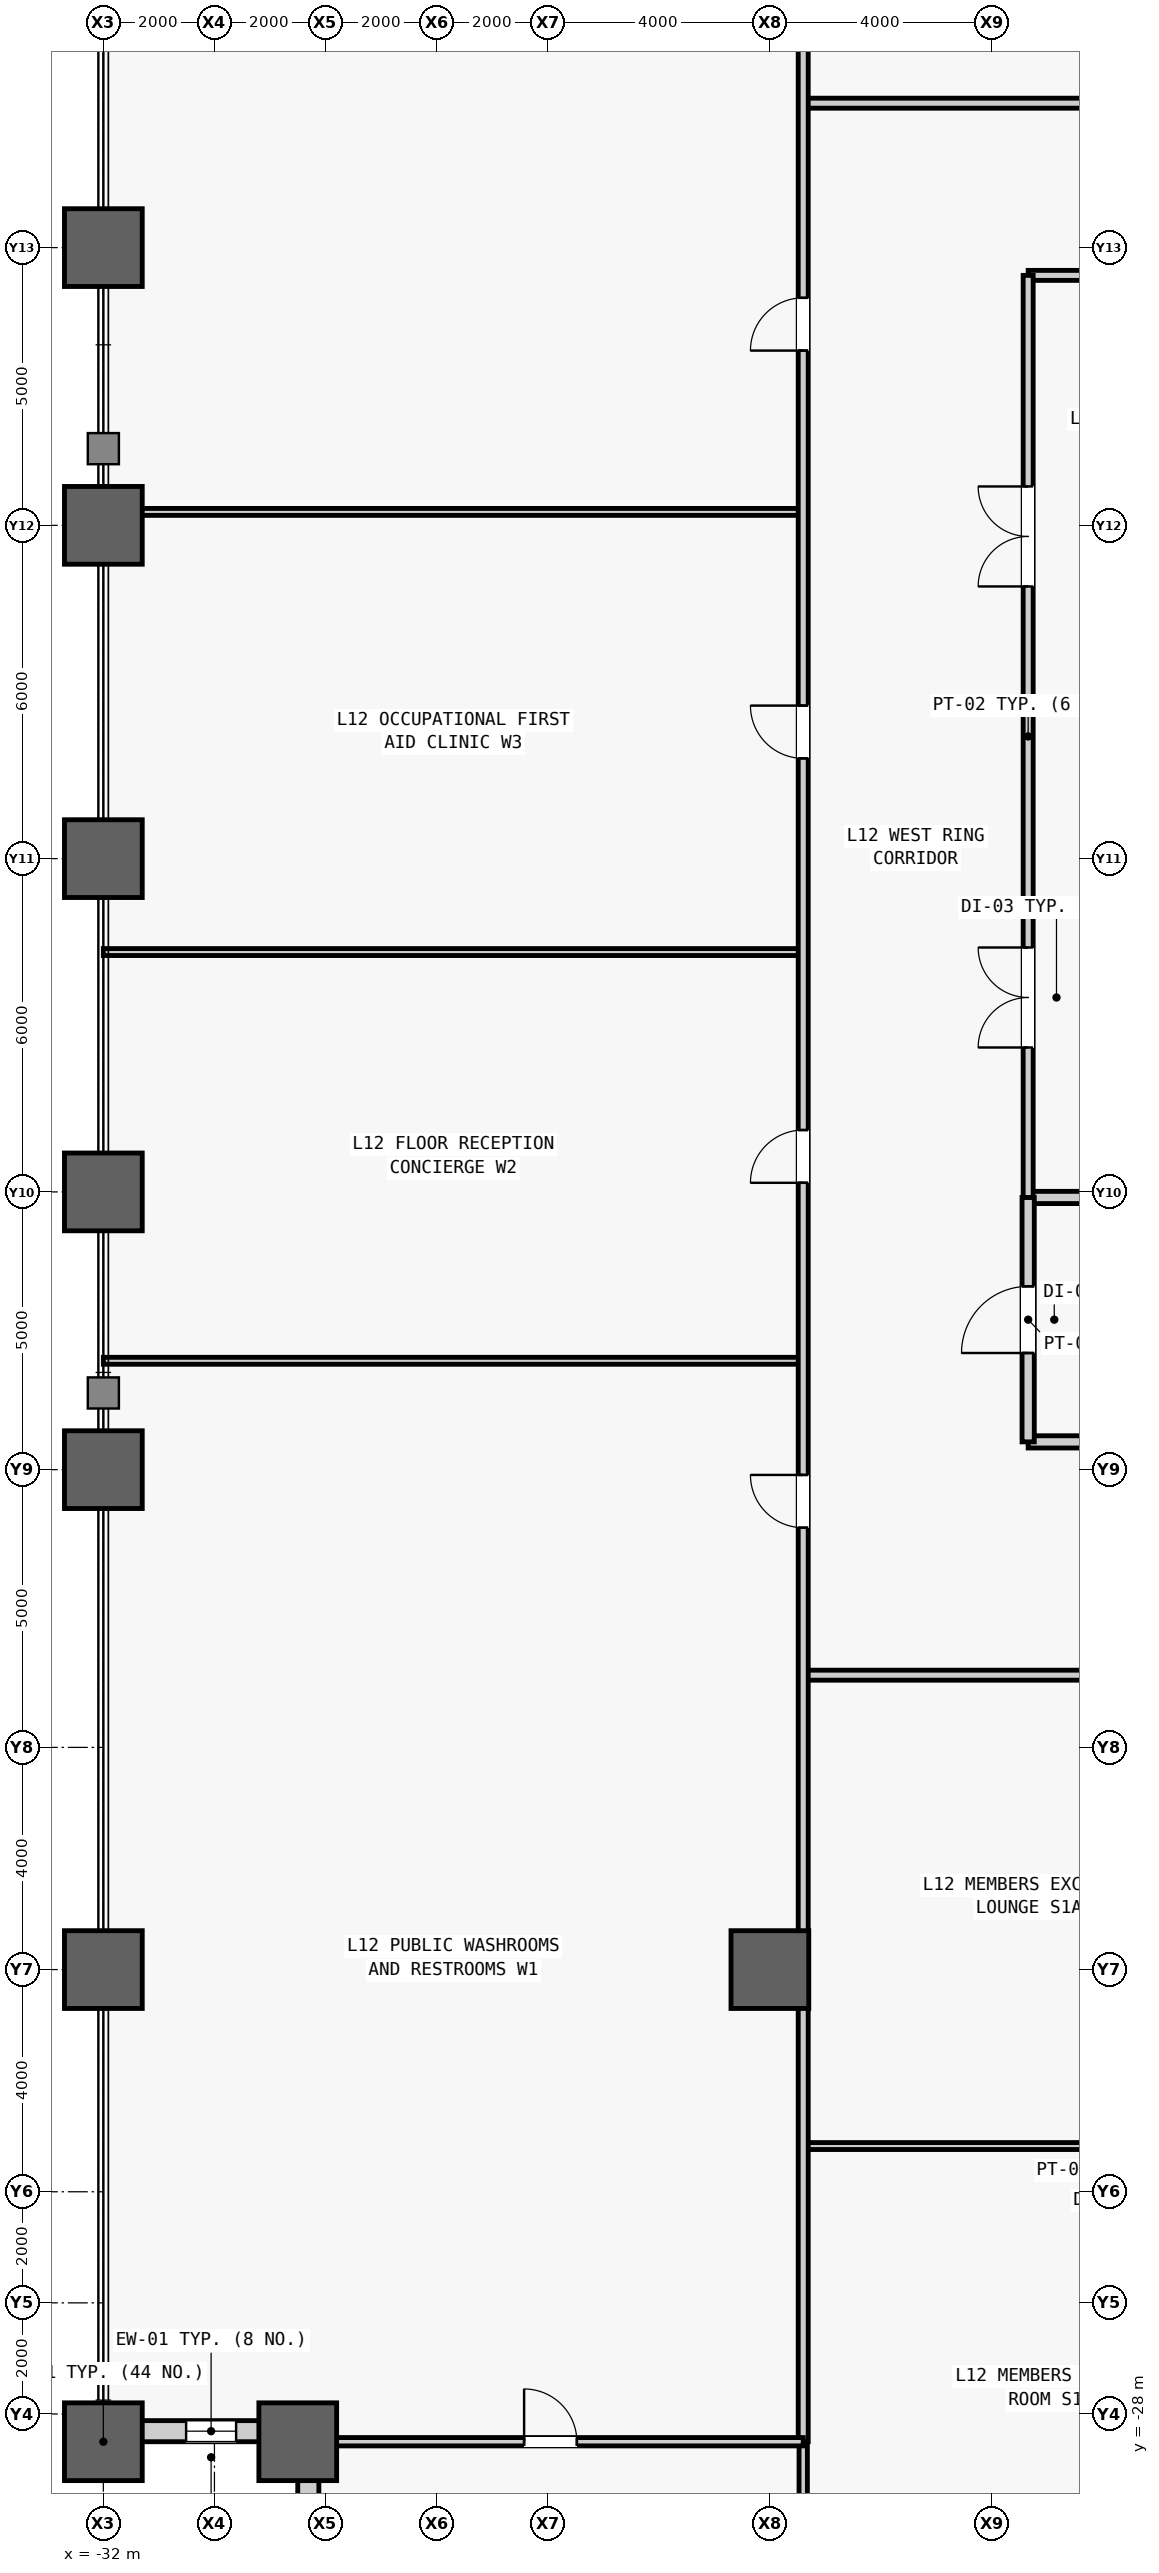
"""IFC4 building model, lengths in metres.
Left out: names, types, materials, properties, quantities, classifications, styles, units other than length and angle.
Written with IfcOpenShell. Run it as: python <this file> out.ifc"""

import sys

from ifc_helpers import new_model, si_unit, direction, frame, frame_2d, origin, origin_2d, place, context, subcontext, project, spatial, rectangle, hollow_rectangle, extrude, source, transform, mapped, element, fill, save


model = new_model("IFC4")
c1 = context("Model", 3, precision=1e-05, world=origin(), true_north=direction((0.0, 1.0)))
c2 = subcontext(c1, "Body", "Model", "MODEL_VIEW")
j1 = project(units=[si_unit("LENGTHUNIT", "METRE"), si_unit("PLANEANGLEUNIT", "RADIAN")], contexts=[c1])
p1 = place(None, origin())
s1 = spatial("IfcSite", under=j1, at=p1, CompositionType="ELEMENT")
p2 = place(p1, origin())
s2 = spatial("IfcBuilding", under=s1, at=p2, CompositionType="ELEMENT")
p3 = place(p2, frame((0.0, 0.0, 57.8)))
s3 = spatial("IfcBuildingStorey", under=s2, at=p3, CompositionType="ELEMENT", Elevation=57.8)
m1 = source(origin(), c2, "Body", "SweptSolid", [
    extrude(hollow_rectangle(XDim=1.4, YDim=1.4, WallThickness=0.075, at=origin_2d()), origin(), (0.0, 0.0, 1.0), 4.2),
])
for number, where, z_axis, x_axis in (
    (1, (-32.0, -28.5, 0.0), (0.0, 0.0, 1.0), (1.0, 0.0, 0.0)),
    (2, (-32.0, -20.0, 0.0), (0.0, 0.0, 1.0), (1.0, 0.0, 0.0)),
    (3, (-32.0, -11.0, 0.0), (0.0, 0.0, 1.0), (1.0, 0.0, 0.0)),
    (4, (-32.0, -6.0, 0.0), (0.0, 0.0, 1.0), (1.0, 0.0, 0.0)),
    (5, (-32.0, 0.0, 0.0), (0.0, 0.0, 1.0), (1.0, 0.0, 0.0)),
    (6, (-32.0, 6.0, 0.0), (0.0, 0.0, 1.0), (1.0, 0.0, 0.0)),
    (7, (-32.0, 11.0, 0.0), (0.0, 0.0, 1.0), (1.0, 0.0, 0.0)),
    (8, (-28.5, -28.5, 0.0), (0.0, 0.0, 1.0), (1.0, 0.0, 0.0)),
    (9, (-20.0, -20.0, 0.0), (0.0, 0.0, 1.0), (1.0, 0.0, 0.0)),
):
    element("IfcColumn", number, at=place(p3, frame(where, z_axis=z_axis, x_axis=x_axis)), inside=s3, PredefinedType="COLUMN", context=c2, shape_type="MappedRepresentation", body=[
        mapped(m1, transform((0.0, 0.0, 0.0), scale=1.0)),
    ])
m2 = source(origin(), c2, "Body", "SweptSolid", [
    extrude(rectangle(XDim=3.12, YDim=0.38, at=frame_2d((1.56, 0.0))), origin(), (0.0, 0.0, 1.0), 3.245),
])
p4 = place(p3, frame((-28.5, -28.31, 0.0), z_axis=(0.0, 0.0, 1.0), x_axis=(-1.0, 0.0, 0.0)))
e10 = element("IfcWall", 10, at=p4, inside=s3, PredefinedType="STANDARD", context=c2, shape_type="MappedRepresentation", body=[
    mapped(m2, transform((0.0, 0.0, 0.0), scale=1.0)),
])
m3 = source(origin(), c2, "Body", "SweptSolid", [
    extrude(rectangle(XDim=0.9, YDim=2.4, at=frame_2d((0.45, 1.2))), frame((0.0, 0.2, 0.0), z_axis=(0.0, -1.0, 0.0), x_axis=(1.0, 0.0, 0.0)), (0.0, 0.0, 1.0), 0.4),
])
p5 = place(p4, frame((1.11, 0.0, 0.5)))
e11 = element("IfcOpeningElement", 11, at=p5, cuts=e10, PredefinedType="OPENING", context=c2, shape_type="MappedRepresentation", body=[
    mapped(m3, transform((0.0, 0.0, 0.0), scale=1.0)),
])
p6 = place(p3, frame((-28.31, -31.62, 0.0), z_axis=(0.0, 0.0, 1.0), x_axis=(0.0, 1.0, 0.0)))
e12 = element("IfcWall", 12, at=p6, inside=s3, PredefinedType="STANDARD", context=c2, shape_type="MappedRepresentation", body=[
    mapped(m2, transform((0.0, 0.0, 0.0), scale=1.0)),
])
p7 = place(p6, frame((1.11, 0.0, 0.5)))
e13 = element("IfcOpeningElement", 13, at=p7, cuts=e12, PredefinedType="OPENING", context=c2, shape_type="MappedRepresentation", body=[
    mapped(m3, transform((0.0, 0.0, 0.0), scale=1.0)),
])
m4 = source(origin(), c2, "Body", "SweptSolid", [
    extrude(rectangle(XDim=4.05, YDim=0.22, at=frame_2d((2.025, 0.0))), origin(), (0.0, 0.0, 1.0), 3.94),
])
p8 = place(p3, frame((-15.35, -10.5, 0.0), z_axis=(0.0, 0.0, 1.0), x_axis=(1.0, 0.0, 0.0)))
e14 = element("IfcWall", 14, at=p8, inside=s3, PredefinedType="PARTITIONING", context=c2, shape_type="MappedRepresentation", body=[
    mapped(m4, transform((0.0, 0.0, 0.0), scale=1.0)),
])
m5 = source(origin(), c2, "Body", "SweptSolid", [
    extrude(rectangle(XDim=4.05, YDim=0.22, at=frame_2d((2.025, 0.0))), origin(), (0.0, 0.0, 1.0), 3.085),
])
p9 = place(p3, frame((-15.35, -6.1, 0.0), z_axis=(0.0, 0.0, 1.0), x_axis=(1.0, 0.0, 0.0)))
e15 = element("IfcWall", 15, at=p9, inside=s3, PredefinedType="PARTITIONING", context=c2, shape_type="MappedRepresentation", body=[
    mapped(m5, transform((0.0, 0.0, 0.0), scale=1.0)),
])
m6 = source(origin(), c2, "Body", "SweptSolid", [
    extrude(rectangle(XDim=4.4, YDim=0.22, at=frame_2d((2.2, 0.0))), origin(), (0.0, 0.0, 1.0), 3.94),
])
p10 = place(p3, frame((-15.35, -10.5, 0.0), z_axis=(0.0, 0.0, 1.0), x_axis=(0.0, 1.0, 0.0)))
e16 = element("IfcWall", 16, at=p10, inside=s3, PredefinedType="PARTITIONING", context=c2, shape_type="MappedRepresentation", body=[
    mapped(m6, transform((0.0, 0.0, 0.0), scale=1.0)),
])
m7 = source(origin(), c2, "Body", "SweptSolid", [
    extrude(rectangle(XDim=1.2, YDim=2.2, at=frame_2d((0.6, 1.1))), frame((0.0, 0.12, 0.0), z_axis=(0.0, -1.0, 0.0), x_axis=(1.0, 0.0, 0.0)), (0.0, 0.0, 1.0), 0.24),
])
p11 = place(p10, frame((1.6, 0.0, 0.0)))
e17 = element("IfcOpeningElement", 17, at=p11, cuts=e16, PredefinedType="OPENING", context=c2, shape_type="MappedRepresentation", body=[
    mapped(m7, transform((0.0, 0.0, 0.0), scale=1.0)),
])
m8 = source(origin(), c2, "Body", "SweptSolid", [
    extrude(rectangle(XDim=4.05, YDim=0.18, at=frame_2d((2.025, 0.0))), origin(), (0.0, 0.0, 1.0), 3.94),
])
p12 = place(p3, frame((-15.35, 10.5, 0.0), z_axis=(0.0, 0.0, 1.0), x_axis=(1.0, 0.0, 0.0)))
e18 = element("IfcWall", 18, at=p12, inside=s3, PredefinedType="PARTITIONING", context=c2, shape_type="MappedRepresentation", body=[
    mapped(m8, transform((0.0, 0.0, 0.0), scale=1.0)),
])
m9 = source(origin(), c2, "Body", "SweptSolid", [
    extrude(rectangle(XDim=16.6, YDim=0.18, at=frame_2d((8.3, 0.0))), origin(), (0.0, 0.0, 1.0), 3.94),
])
p13 = place(p3, frame((-15.35, -6.1, 0.0), z_axis=(0.0, 0.0, 1.0), x_axis=(0.0, 1.0, 0.0)))
e19 = element("IfcWall", 19, at=p13, inside=s3, PredefinedType="PARTITIONING", context=c2, shape_type="MappedRepresentation", body=[
    mapped(m9, transform((0.0, 0.0, 0.0), scale=1.0)),
])
m10 = source(origin(), c2, "Body", "SweptSolid", [
    extrude(rectangle(XDim=1.8, YDim=2.25, at=frame_2d((0.9, 1.125))), frame((0.0, 0.1, 0.0), z_axis=(0.0, -1.0, 0.0), x_axis=(1.0, 0.0, 0.0)), (0.0, 0.0, 1.0), 0.2),
])
p14 = place(p13, frame((2.7, 0.0, 0.0)))
e20 = element("IfcOpeningElement", 20, at=p14, cuts=e19, PredefinedType="OPENING", context=c2, shape_type="MappedRepresentation", body=[
    mapped(m10, transform((0.0, 0.0, 0.0), scale=1.0)),
])
p15 = place(p13, frame((11.0, 0.0, 0.0)))
e21 = element("IfcOpeningElement", 21, at=p15, cuts=e19, PredefinedType="OPENING", context=c2, shape_type="MappedRepresentation", body=[
    mapped(m10, transform((0.0, 0.0, 0.0), scale=1.0)),
])
m11 = source(origin(), c2, "Body", "SweptSolid", [
    extrude(rectangle(XDim=13.356, YDim=0.125, at=frame_2d((6.678, 0.0))), origin(), (0.0, 0.0, 1.0), 3.94),
])
p16 = place(p3, frame((-19.4, -23.177, 0.0), z_axis=(0.0, 0.0, 1.0), x_axis=(1.0, 0.0, 0.0)))
e22 = element("IfcWall", 22, at=p16, inside=s3, PredefinedType="PARTITIONING", context=c2, shape_type="MappedRepresentation", body=[
    mapped(m11, transform((0.0, 0.0, 0.0), scale=1.0)),
])
m12 = source(origin(), c2, "Body", "SweptSolid", [
    extrude(rectangle(XDim=0.95, YDim=2.15, at=frame_2d((0.475, 1.075))), frame((0.0, 0.073, 0.0), z_axis=(0.0, -1.0, 0.0), x_axis=(1.0, 0.0, 0.0)), (0.0, 0.0, 1.0), 0.145),
])
p17 = place(p16, frame((6.203, 0.0, 0.0)))
e23 = element("IfcOpeningElement", 23, at=p17, cuts=e22, PredefinedType="OPENING", context=c2, shape_type="MappedRepresentation", body=[
    mapped(m12, transform((0.0, 0.0, 0.0), scale=1.0)),
])
m13 = source(origin(), c2, "Body", "SweptSolid", [
    extrude(rectangle(XDim=37.1, YDim=0.18, at=frame_2d((18.55, 0.0))), origin(), (0.0, 0.0, 1.0), 3.94),
])
p18 = place(p3, frame((-19.4, -14.7, 0.0), z_axis=(0.0, 0.0, 1.0), x_axis=(1.0, 0.0, 0.0)))
e24 = element("IfcWall", 24, at=p18, inside=s3, PredefinedType="PARTITIONING", context=c2, shape_type="MappedRepresentation", body=[
    mapped(m13, transform((0.0, 0.0, 0.0), scale=1.0)),
])
m14 = source(origin(), c2, "Body", "SweptSolid", [
    extrude(rectangle(XDim=1.05, YDim=2.2, at=frame_2d((0.525, 1.1))), frame((0.0, 0.1, 0.0), z_axis=(0.0, -1.0, 0.0), x_axis=(1.0, 0.0, 0.0)), (0.0, 0.0, 1.0), 0.2),
])
p19 = place(p18, frame((8.653, 0.0, 0.0)))
e25 = element("IfcOpeningElement", 25, at=p19, cuts=e24, PredefinedType="OPENING", context=c2, shape_type="MappedRepresentation", body=[
    mapped(m14, transform((0.0, 0.0, 0.0), scale=1.0)),
])
p20 = place(p18, frame((19.509, 0.0, 0.0)))
e26 = element("IfcOpeningElement", 26, at=p20, cuts=e24, PredefinedType="OPENING", context=c2, shape_type="MappedRepresentation", body=[
    mapped(m14, transform((0.0, 0.0, 0.0), scale=1.0)),
])
p21 = place(p18, frame((29.731, 0.0, 0.0)))
e27 = element("IfcOpeningElement", 27, at=p21, cuts=e24, PredefinedType="OPENING", context=c2, shape_type="MappedRepresentation", body=[
    mapped(m14, transform((0.0, 0.0, 0.0), scale=1.0)),
])
p22 = place(p3, frame((-19.4, 13.6, 0.0), z_axis=(0.0, 0.0, 1.0), x_axis=(1.0, 0.0, 0.0)))
e28 = element("IfcWall", 28, at=p22, inside=s3, PredefinedType="PARTITIONING", context=c2, shape_type="MappedRepresentation", body=[
    mapped(m13, transform((0.0, 0.0, 0.0), scale=1.0)),
])
p23 = place(p22, frame((10.879, 0.0, 0.0)))
e29 = element("IfcOpeningElement", 29, at=p23, cuts=e28, PredefinedType="OPENING", context=c2, shape_type="MappedRepresentation", body=[
    mapped(m14, transform((0.0, 0.0, 0.0), scale=1.0)),
])
p24 = place(p22, frame((25.279, 0.0, 0.0)))
e30 = element("IfcOpeningElement", 30, at=p24, cuts=e28, PredefinedType="OPENING", context=c2, shape_type="MappedRepresentation", body=[
    mapped(m14, transform((0.0, 0.0, 0.0), scale=1.0)),
])
m15 = source(origin(), c2, "Body", "SweptSolid", [
    extrude(rectangle(XDim=3.5, YDim=0.15, at=frame_2d((1.75, 0.0))), origin(), (0.0, 0.0, 1.0), 3.94),
])
p25 = place(p3, frame((-19.4, -32.0, 0.0), z_axis=(0.0, 0.0, 1.0), x_axis=(0.0, 1.0, 0.0)))
e31 = element("IfcWall", 31, at=p25, inside=s3, PredefinedType="PARTITIONING", context=c2, shape_type="MappedRepresentation", body=[
    mapped(m15, transform((0.0, 0.0, 0.0), scale=1.0)),
])
m16 = source(origin(), c2, "Body", "SweptSolid", [
    extrude(rectangle(XDim=12.6, YDim=0.125, at=frame_2d((6.3, 0.0))), origin(), (0.0, 0.0, 1.0), 3.94),
])
for number, where, z_axis, x_axis in (
    (32, (-32.0, -9.04, 0.0), (0.0, 0.0, 1.0), (1.0, 0.0, 0.0)),
    (33, (-32.0, -1.682, 0.0), (0.0, 0.0, 1.0), (1.0, 0.0, 0.0)),
):
    element("IfcWall", number, at=place(p3, frame(where, z_axis=z_axis, x_axis=x_axis)), inside=s3, PredefinedType="PARTITIONING", context=c2, shape_type="MappedRepresentation", body=[
        mapped(m16, transform((0.0, 0.0, 0.0), scale=1.0)),
    ])
m17 = source(origin(), c2, "Body", "SweptSolid", [
    extrude(rectangle(XDim=12.6, YDim=0.125, at=frame_2d((6.3, 0.0))), origin(), (0.0, 0.0, 1.0), 3.085),
])
p26 = place(p3, frame((-32.0, 6.242, 0.0), z_axis=(0.0, 0.0, 1.0), x_axis=(1.0, 0.0, 0.0)))
e34 = element("IfcWall", 34, at=p26, inside=s3, PredefinedType="PARTITIONING", context=c2, shape_type="MappedRepresentation", body=[
    mapped(m17, transform((0.0, 0.0, 0.0), scale=1.0)),
])
m18 = source(origin(), c2, "Body", "SweptSolid", [
    extrude(rectangle(XDim=57.0, YDim=0.18, at=frame_2d((28.5, 0.0))), origin(), (0.0, 0.0, 1.0), 3.471),
])
p27 = place(p3, frame((-19.4, -28.5, 0.0), z_axis=(0.0, 0.0, 1.0), x_axis=(0.0, 1.0, 0.0)))
e35 = element("IfcWall", 35, at=p27, inside=s3, PredefinedType="PARTITIONING", context=c2, shape_type="MappedRepresentation", body=[
    mapped(m18, transform((0.0, 0.0, 0.0), scale=1.0)),
])
m19 = source(origin(), c2, "Body", "SweptSolid", [
    extrude(rectangle(XDim=0.95, YDim=2.15, at=frame_2d((0.475, 1.075))), frame((0.0, 0.1, 0.0), z_axis=(0.0, -1.0, 0.0), x_axis=(1.0, 0.0, 0.0)), (0.0, 0.0, 1.0), 0.2),
])
p28 = place(p27, frame((16.455, 0.0, 0.0)))
e36 = element("IfcOpeningElement", 36, at=p28, cuts=e35, PredefinedType="OPENING", context=c2, shape_type="MappedRepresentation", body=[
    mapped(m19, transform((0.0, 0.0, 0.0), scale=1.0)),
])
p29 = place(p27, frame((22.664, 0.0, 0.0)))
e37 = element("IfcOpeningElement", 37, at=p29, cuts=e35, PredefinedType="OPENING", context=c2, shape_type="MappedRepresentation", body=[
    mapped(m19, transform((0.0, 0.0, 0.0), scale=1.0)),
])
p30 = place(p27, frame((30.305, 0.0, 0.0)))
e38 = element("IfcOpeningElement", 38, at=p30, cuts=e35, PredefinedType="OPENING", context=c2, shape_type="MappedRepresentation", body=[
    mapped(m19, transform((0.0, 0.0, 0.0), scale=1.0)),
])
p31 = place(p27, frame((37.646, 0.0, 0.0)))
e39 = element("IfcOpeningElement", 39, at=p31, cuts=e35, PredefinedType="OPENING", context=c2, shape_type="MappedRepresentation", body=[
    mapped(m19, transform((0.0, 0.0, 0.0), scale=1.0)),
])
m20 = source(origin(), c2, "Body", "SweptSolid", [
    extrude(rectangle(XDim=9.1, YDim=0.15, at=frame_2d((4.55, 0.0))), origin(), (0.0, 0.0, 1.0), 3.94),
])
p32 = place(p3, frame((-28.5, -28.5, 0.0), z_axis=(0.0, 0.0, 1.0), x_axis=(1.0, 0.0, 0.0)))
e40 = element("IfcWall", 40, at=p32, inside=s3, PredefinedType="PARTITIONING", context=c2, shape_type="MappedRepresentation", body=[
    mapped(m20, transform((0.0, 0.0, 0.0), scale=1.0)),
])
m21 = source(origin(), c2, "Body", "SweptSolid", [
    extrude(rectangle(XDim=0.95, YDim=2.15, at=frame_2d((0.475, 1.075))), frame((0.0, 0.085, 0.0), z_axis=(0.0, -1.0, 0.0), x_axis=(1.0, 0.0, 0.0)), (0.0, 0.0, 1.0), 0.17),
])
p33 = place(p32, frame((4.075, 0.0, 0.0)))
e41 = element("IfcOpeningElement", 41, at=p33, cuts=e40, PredefinedType="OPENING", context=c2, shape_type="MappedRepresentation", body=[
    mapped(m21, transform((0.0, 0.0, 0.0), scale=1.0)),
])
m22 = source(origin(), c2, "Body", "SweptSolid", [
    extrude(rectangle(XDim=0.9, YDim=2.4, at=frame_2d((0.45, 1.2))), frame((0.0, 0.03, 0.0), z_axis=(0.0, -1.0, 0.0), x_axis=(1.0, 0.0, 0.0)), (0.0, 0.0, 1.0), 0.06),
])
p34 = place(p5, origin())
e42 = element("IfcWindow", 42, at=p34, inside=s3, PartitioningType="SINGLE_PANEL", PredefinedType="WINDOW", context=c2, shape_type="MappedRepresentation", body=[
    mapped(m22, transform((0.0, 0.0, 0.0), scale=1.0)),
])
fill(e11, e42)
m23 = source(origin(), c2, "Body", "SweptSolid", [
    extrude(rectangle(XDim=1.2, YDim=2.2, at=frame_2d((0.6, 1.1))), frame((0.0, 0.025, 0.0), z_axis=(0.0, -1.0, 0.0), x_axis=(1.0, 0.0, 0.0)), (0.0, 0.0, 1.0), 0.05),
])
p35 = place(p11, origin())
e43 = element("IfcDoor", 43, at=p35, inside=s3, OperationType="SINGLE_SWING_LEFT", PredefinedType="DOOR", context=c2, shape_type="MappedRepresentation", body=[
    mapped(m23, transform((0.0, 0.0, 0.0), scale=1.0)),
])
fill(e17, e43)
m24 = source(origin(), c2, "Body", "SweptSolid", [
    extrude(rectangle(XDim=1.8, YDim=2.25, at=frame_2d((0.9, 1.125))), frame((0.0, 0.025, 0.0), z_axis=(0.0, -1.0, 0.0), x_axis=(1.0, 0.0, 0.0)), (0.0, 0.0, 1.0), 0.05),
])
p36 = place(p14, origin())
e44 = element("IfcDoor", 44, at=p36, inside=s3, OperationType="SINGLE_SWING_LEFT", PredefinedType="DOOR", context=c2, shape_type="MappedRepresentation", body=[
    mapped(m24, transform((0.0, 0.0, 0.0), scale=1.0)),
])
fill(e20, e44)
p37 = place(p15, origin())
e45 = element("IfcDoor", 45, at=p37, inside=s3, OperationType="SINGLE_SWING_RIGHT", PredefinedType="DOOR", context=c2, shape_type="MappedRepresentation", body=[
    mapped(m24, transform((0.0, 0.0, 0.0), scale=1.0)),
])
fill(e21, e45)
m25 = source(origin(), c2, "Body", "SweptSolid", [
    extrude(rectangle(XDim=0.95, YDim=2.15, at=frame_2d((0.475, 1.075))), frame((0.0, 0.025, 0.0), z_axis=(0.0, -1.0, 0.0), x_axis=(1.0, 0.0, 0.0)), (0.0, 0.0, 1.0), 0.05),
])
p38 = place(p28, origin())
e46 = element("IfcDoor", 46, at=p38, inside=s3, OperationType="SINGLE_SWING_RIGHT", PredefinedType="DOOR", context=c2, shape_type="MappedRepresentation", body=[
    mapped(m25, transform((0.0, 0.0, 0.0), scale=1.0)),
])
fill(e36, e46)
p39 = place(p29, origin())
e47 = element("IfcDoor", 47, at=p39, inside=s3, OperationType="SINGLE_SWING_LEFT", PredefinedType="DOOR", context=c2, shape_type="MappedRepresentation", body=[
    mapped(m25, transform((0.0, 0.0, 0.0), scale=1.0)),
])
fill(e37, e47)
p40 = place(p30, origin())
e48 = element("IfcDoor", 48, at=p40, inside=s3, OperationType="SINGLE_SWING_RIGHT", PredefinedType="DOOR", context=c2, shape_type="MappedRepresentation", body=[
    mapped(m25, transform((0.0, 0.0, 0.0), scale=1.0)),
])
fill(e38, e48)
p41 = place(p31, origin())
e49 = element("IfcDoor", 49, at=p41, inside=s3, OperationType="SINGLE_SWING_LEFT", PredefinedType="DOOR", context=c2, shape_type="MappedRepresentation", body=[
    mapped(m25, transform((0.0, 0.0, 0.0), scale=1.0)),
])
fill(e39, e49)
p42 = place(p33, origin())
e50 = element("IfcDoor", 50, at=p42, inside=s3, OperationType="SINGLE_SWING_LEFT", PredefinedType="DOOR", context=c2, shape_type="MappedRepresentation", body=[
    mapped(m25, transform((0.0, 0.0, 0.0), scale=1.0)),
])
fill(e41, e50)
save(model, sys.argv[1])
